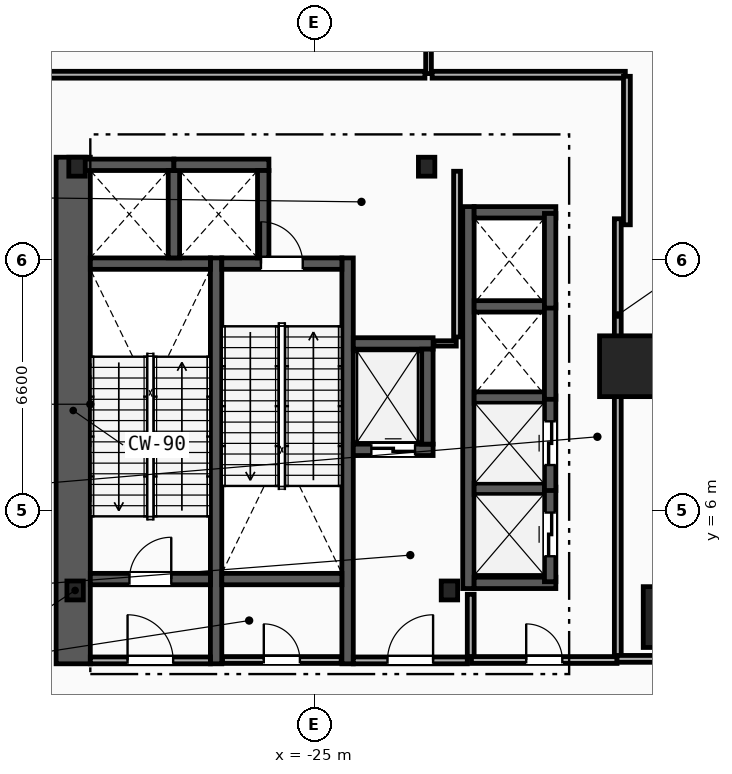
"""IFC4 building model, lengths in metres.
Left out: names, types, materials, properties, quantities, classifications, styles, units other than length and angle.
Written with IfcOpenShell. Run it as: python <this file> out.ifc"""

import sys

from ifc_helpers import new_model, si_unit, direction, frame, frame_2d, origin, origin_2d, place, context, subcontext, project, spatial, rectangle, i_section, extrude, element, fill, save


model = new_model("IFC4")
c1 = context("Model", 3, precision=1e-05, world=origin(), true_north=direction((0.0, 1.0)))
c2 = subcontext(c1, "Body", "Model", "MODEL_VIEW")
j1 = project(units=[si_unit("LENGTHUNIT", "METRE"), si_unit("PLANEANGLEUNIT", "RADIAN")], contexts=[c1])
p1 = place(None, origin())
s1 = spatial("IfcSite", under=j1, at=p1, CompositionType="ELEMENT")
p2 = place(p1, origin())
s2 = spatial("IfcBuilding", under=s1, at=p2, CompositionType="ELEMENT")
p3 = place(p2, frame((0.0, 0.0, 6.0)))
s3 = spatial("IfcBuildingStorey", under=s2, at=p3, CompositionType="ELEMENT", Elevation=6.0)
for number, where, z_axis, x_axis in (
    (1, (-31.3, 3.9, 0.0), (0.0, 0.0, 1.0), (1.0, 0.0, 0.0)),
    (2, (-21.45, 3.9, 0.0), (0.0, 0.0, 1.0), (1.0, 0.0, 0.0)),
    (3, (-22.05, 15.05, 0.0), (0.0, 0.0, 1.0), (1.0, 0.0, 0.0)),
    (4, (-31.25, 15.05, 0.0), (0.0, 0.0, 1.0), (1.0, 0.0, 0.0)),
):
    element("IfcColumn", number, at=place(p3, frame(where, z_axis=z_axis, x_axis=x_axis)), inside=s3, PredefinedType="COLUMN", context=c2, shape_type="SweptSolid", body=[
        extrude(i_section(OverallWidth=0.432, OverallDepth=0.498, WebThickness=0.056, FlangeThickness=0.089, FilletRadius=0.018, at=origin_2d()), origin(), (0.0, 0.0, 1.0), 6.0),
    ])
for number, where, z_axis, x_axis in (
    (5, (-15.55, 3.2, 0.0), (0.0, 0.0, 1.0), (1.0, 0.0, 0.0)),
    (6, (-16.7, 9.8, 0.0), (0.0, 0.0, 1.0), (1.0, 0.0, 0.0)),
):
    element("IfcColumn", number, at=place(p3, frame(where, z_axis=z_axis, x_axis=x_axis)), inside=s3, PredefinedType="COLUMN", context=c2, shape_type="SweptSolid", body=[
        extrude(rectangle(XDim=1.6, YDim=1.6, at=origin_2d()), origin(), (0.0, 0.0, 1.0), 6.0),
    ])
p4 = place(p3, frame((-31.35, 1.97, 0.0), z_axis=(0.0, 0.0, 1.0), x_axis=(0.0, 1.0, 0.0)))
e7 = element("IfcWall", 7, at=p4, inside=s3, PredefinedType="SHEAR", context=c2, shape_type="SweptSolid", body=[
    extrude(rectangle(XDim=13.33, YDim=0.9, at=frame_2d((6.665, 0.0))), origin(), (0.0, 0.0, 1.0), 5.65),
])
for number, where, z_axis, x_axis in (
    (8, (-27.59, 1.97, 0.0), (0.0, 0.0, 1.0), (0.0, 1.0, 0.0)),
    (9, (-24.13, 1.97, 0.0), (0.0, 0.0, 1.0), (0.0, 1.0, 0.0)),
):
    element("IfcWall", number, at=place(p3, frame(where, z_axis=z_axis, x_axis=x_axis)), inside=s3, PredefinedType="SHEAR", context=c2, shape_type="SweptSolid", body=[
        extrude(rectangle(XDim=10.68, YDim=0.3, at=frame_2d((5.34, 0.0))), origin(), (0.0, 0.0, 1.0), 5.65),
    ])
p5 = place(p3, frame((-30.9, 4.2, 0.0), z_axis=(0.0, 0.0, 1.0), x_axis=(1.0, 0.0, 0.0)))
e10 = element("IfcWall", 10, at=p5, inside=s3, PredefinedType="SHEAR", context=c2, shape_type="SweptSolid", body=[
    extrude(rectangle(XDim=3.16, YDim=0.3, at=frame_2d((1.58, 0.0))), origin(), (0.0, 0.0, 1.0), 5.65),
])
p6 = place(p5, frame((1.03, 0.0, 0.0)))
e11 = element("IfcOpeningElement", 11, at=p6, cuts=e10, PredefinedType="OPENING", context=c2, shape_type="SweptSolid", body=[
    extrude(rectangle(XDim=1.1, YDim=2.15, at=frame_2d((0.55, 1.075))), frame((0.0, 0.16, 0.0), z_axis=(0.0, -1.0, 0.0), x_axis=(1.0, 0.0, 0.0)), (0.0, 0.0, 1.0), 0.32),
])
p7 = place(p3, frame((-30.9, 12.5, 0.0), z_axis=(0.0, 0.0, 1.0), x_axis=(1.0, 0.0, 0.0)))
e12 = element("IfcWall", 12, at=p7, inside=s3, PredefinedType="SHEAR", context=c2, shape_type="SweptSolid", body=[
    extrude(rectangle(XDim=3.16, YDim=0.3, at=frame_2d((1.58, 0.0))), origin(), (0.0, 0.0, 1.0), 5.65),
])
p8 = place(p3, frame((-27.44, 12.5, 0.0), z_axis=(0.0, 0.0, 1.0), x_axis=(1.0, 0.0, 0.0)))
e13 = element("IfcWall", 13, at=p8, inside=s3, PredefinedType="SHEAR", context=c2, shape_type="SweptSolid", body=[
    extrude(rectangle(XDim=3.16, YDim=0.3, at=frame_2d((1.58, 0.0))), origin(), (0.0, 0.0, 1.0), 5.65),
])
p9 = place(p8, frame((1.03, 0.0, 0.0)))
e14 = element("IfcOpeningElement", 14, at=p9, cuts=e13, PredefinedType="OPENING", context=c2, shape_type="SweptSolid", body=[
    extrude(rectangle(XDim=1.1, YDim=2.15, at=frame_2d((0.55, 1.075))), frame((0.0, 0.16, 0.0), z_axis=(0.0, -1.0, 0.0), x_axis=(1.0, 0.0, 0.0)), (0.0, 0.0, 1.0), 0.32),
])
p10 = place(p3, frame((-27.44, 4.2, 0.0), z_axis=(0.0, 0.0, 1.0), x_axis=(1.0, 0.0, 0.0)))
e15 = element("IfcWall", 15, at=p10, inside=s3, PredefinedType="SHEAR", context=c2, shape_type="SweptSolid", body=[
    extrude(rectangle(XDim=3.16, YDim=0.3, at=frame_2d((1.58, 0.0))), origin(), (0.0, 0.0, 1.0), 5.65),
])
p11 = place(p3, frame((-20.89, 2.15, 0.0), z_axis=(0.0, 0.0, 1.0), x_axis=(0.0, 1.0, 0.0)))
e16 = element("IfcWall", 16, at=p11, inside=s3, PredefinedType="PARTITIONING", context=c2, shape_type="SweptSolid", body=[
    extrude(rectangle(XDim=1.65, YDim=0.18, at=frame_2d((0.825, 0.0))), origin(), (0.0, 0.0, 1.0), 5.65),
])
p12 = place(p3, frame((-23.98, 2.06, 0.0), z_axis=(0.0, 0.0, 1.0), x_axis=(1.0, 0.0, 0.0)))
e17 = element("IfcWall", 17, at=p12, inside=s3, PredefinedType="PARTITIONING", context=c2, shape_type="SweptSolid", body=[
    extrude(rectangle(XDim=3.0, YDim=0.18, at=frame_2d((1.5, 0.0))), origin(), (0.0, 0.0, 1.0), 5.65),
])
p13 = place(p12, frame((0.9, 0.0, 0.0)))
e18 = element("IfcOpeningElement", 18, at=p13, cuts=e17, PredefinedType="OPENING", context=c2, shape_type="SweptSolid", body=[
    extrude(rectangle(XDim=1.2, YDim=2.15, at=frame_2d((0.6, 1.075))), frame((0.0, 0.1, 0.0), z_axis=(0.0, -1.0, 0.0), x_axis=(1.0, 0.0, 0.0)), (0.0, 0.0, 1.0), 0.2),
])
p14 = place(p3, frame((-30.9, 2.06, 0.0), z_axis=(0.0, 0.0, 1.0), x_axis=(1.0, 0.0, 0.0)))
e19 = element("IfcWall", 19, at=p14, inside=s3, PredefinedType="PARTITIONING", context=c2, shape_type="SweptSolid", body=[
    extrude(rectangle(XDim=3.16, YDim=0.18, at=frame_2d((1.58, 0.0))), origin(), (0.0, 0.0, 1.0), 5.65),
])
p15 = place(p14, frame((0.98, 0.0, 0.0)))
e20 = element("IfcOpeningElement", 20, at=p15, cuts=e19, PredefinedType="OPENING", context=c2, shape_type="SweptSolid", body=[
    extrude(rectangle(XDim=1.2, YDim=2.15, at=frame_2d((0.6, 1.075))), frame((0.0, 0.1, 0.0), z_axis=(0.0, -1.0, 0.0), x_axis=(1.0, 0.0, 0.0)), (0.0, 0.0, 1.0), 0.2),
])
p16 = place(p3, frame((-23.98, 7.6, 0.0), z_axis=(0.0, 0.0, 1.0), x_axis=(1.0, 0.0, 0.0)))
e21 = element("IfcWall", 21, at=p16, inside=s3, PredefinedType="SHEAR", context=c2, shape_type="SweptSolid", body=[
    extrude(rectangle(XDim=2.1, YDim=0.3, at=frame_2d((1.05, 0.0))), origin(), (0.0, 0.0, 1.0), 5.65),
])
p17 = place(p16, frame((0.475, 0.0, 0.0)))
e22 = element("IfcOpeningElement", 22, at=p17, cuts=e21, PredefinedType="OPENING", context=c2, shape_type="SweptSolid", body=[
    extrude(rectangle(XDim=1.15, YDim=2.2, at=frame_2d((0.575, 1.1))), frame((0.0, 0.16, 0.0), z_axis=(0.0, -1.0, 0.0), x_axis=(1.0, 0.0, 0.0)), (0.0, 0.0, 1.0), 0.32),
])
p18 = place(p3, frame((-23.98, 10.4, 0.0), z_axis=(0.0, 0.0, 1.0), x_axis=(1.0, 0.0, 0.0)))
e23 = element("IfcWall", 23, at=p18, inside=s3, PredefinedType="SHEAR", context=c2, shape_type="SweptSolid", body=[
    extrude(rectangle(XDim=2.1, YDim=0.3, at=frame_2d((1.05, 0.0))), origin(), (0.0, 0.0, 1.0), 5.65),
])
for number, where, z_axis, x_axis in (
    (24, (-22.03, 7.75, 0.0), (0.0, 0.0, 1.0), (0.0, 1.0, 0.0)),
    (25, (-31.2, 15.1, 0.0), (0.0, 0.0, 1.0), (1.0, 0.0, 0.0)),
):
    element("IfcWall", number, at=place(p3, frame(where, z_axis=z_axis, x_axis=x_axis)), inside=s3, PredefinedType="SHEAR", context=c2, shape_type="SweptSolid", body=[
        extrude(rectangle(XDim=2.5, YDim=0.3, at=frame_2d((1.25, 0.0))), origin(), (0.0, 0.0, 1.0), 5.65),
    ])
p19 = place(p3, frame((-28.7, 12.65, 0.0), z_axis=(0.0, 0.0, 1.0), x_axis=(0.0, 1.0, 0.0)))
e26 = element("IfcWall", 26, at=p19, inside=s3, PredefinedType="SHEAR", context=c2, shape_type="SweptSolid", body=[
    extrude(rectangle(XDim=2.3, YDim=0.3, at=frame_2d((1.15, 0.0))), origin(), (0.0, 0.0, 1.0), 5.65),
])
p20 = place(p3, frame((-28.7, 15.1, 0.0), z_axis=(0.0, 0.0, 1.0), x_axis=(1.0, 0.0, 0.0)))
e27 = element("IfcWall", 27, at=p20, inside=s3, PredefinedType="SHEAR", context=c2, shape_type="SweptSolid", body=[
    extrude(rectangle(XDim=2.5, YDim=0.3, at=frame_2d((1.25, 0.0))), origin(), (0.0, 0.0, 1.0), 5.65),
])
p21 = place(p3, frame((-26.35, 12.65, 0.0), z_axis=(0.0, 0.0, 1.0), x_axis=(0.0, 1.0, 0.0)))
e28 = element("IfcWall", 28, at=p21, inside=s3, PredefinedType="SHEAR", context=c2, shape_type="SweptSolid", body=[
    extrude(rectangle(XDim=2.3, YDim=0.3, at=frame_2d((1.15, 0.0))), origin(), (0.0, 0.0, 1.0), 5.65),
])
p22 = place(p3, frame((-20.95, 3.95, 0.0), z_axis=(0.0, 0.0, 1.0), x_axis=(0.0, 1.0, 0.0)))
e29 = element("IfcWall", 29, at=p22, inside=s3, PredefinedType="SHEAR", context=c2, shape_type="SweptSolid", body=[
    extrude(rectangle(XDim=10.05, YDim=0.3, at=frame_2d((5.025, 0.0))), origin(), (0.0, 0.0, 1.0), 5.65),
])
for number, where, z_axis, x_axis in (
    (30, (-20.8, 4.1, 0.0), (0.0, 0.0, 1.0), (1.0, 0.0, 0.0)),
    (31, (-20.8, 13.85, 0.0), (0.0, 0.0, 1.0), (1.0, 0.0, 0.0)),
):
    element("IfcWall", number, at=place(p3, frame(where, z_axis=z_axis, x_axis=x_axis)), inside=s3, PredefinedType="SHEAR", context=c2, shape_type="SweptSolid", body=[
        extrude(rectangle(XDim=2.15, YDim=0.3, at=frame_2d((1.075, 0.0))), origin(), (0.0, 0.0, 1.0), 5.65),
    ])
for number, where, z_axis, x_axis in (
    (32, (-20.8, 6.575, 0.0), (0.0, 0.0, 1.0), (1.0, 0.0, 0.0)),
    (33, (-20.8, 8.975, 0.0), (0.0, 0.0, 1.0), (1.0, 0.0, 0.0)),
    (34, (-20.8, 11.375, 0.0), (0.0, 0.0, 1.0), (1.0, 0.0, 0.0)),
):
    element("IfcWall", number, at=place(p3, frame(where, z_axis=z_axis, x_axis=x_axis)), inside=s3, PredefinedType="SHEAR", context=c2, shape_type="SweptSolid", body=[
        extrude(rectangle(XDim=1.85, YDim=0.3, at=frame_2d((0.925, 0.0))), origin(), (0.0, 0.0, 1.0), 5.65),
    ])
p23 = place(p3, frame((-18.8, 4.13, 0.0), z_axis=(0.0, 0.0, 1.0), x_axis=(0.0, 1.0, 0.0)))
e35 = element("IfcWall", 35, at=p23, inside=s3, PredefinedType="SHEAR", context=c2, shape_type="SweptSolid", body=[
    extrude(rectangle(XDim=2.49, YDim=0.3, at=frame_2d((1.245, 0.0))), origin(), (0.0, 0.0, 1.0), 5.65),
])
p24 = place(p23, frame((0.67, 0.0, 0.0)))
e36 = element("IfcOpeningElement", 36, at=p24, cuts=e35, PredefinedType="OPENING", context=c2, shape_type="SweptSolid", body=[
    extrude(rectangle(XDim=1.15, YDim=2.2, at=frame_2d((0.575, 1.1))), frame((0.0, 0.16, 0.0), z_axis=(0.0, -1.0, 0.0), x_axis=(1.0, 0.0, 0.0)), (0.0, 0.0, 1.0), 0.32),
])
p25 = place(p3, frame((-18.8, 6.53, 0.0), z_axis=(0.0, 0.0, 1.0), x_axis=(0.0, 1.0, 0.0)))
e37 = element("IfcWall", 37, at=p25, inside=s3, PredefinedType="SHEAR", context=c2, shape_type="SweptSolid", body=[
    extrude(rectangle(XDim=2.49, YDim=0.3, at=frame_2d((1.245, 0.0))), origin(), (0.0, 0.0, 1.0), 5.65),
])
p26 = place(p25, frame((0.67, 0.0, 0.0)))
e38 = element("IfcOpeningElement", 38, at=p26, cuts=e37, PredefinedType="OPENING", context=c2, shape_type="SweptSolid", body=[
    extrude(rectangle(XDim=1.15, YDim=2.2, at=frame_2d((0.575, 1.1))), frame((0.0, 0.16, 0.0), z_axis=(0.0, -1.0, 0.0), x_axis=(1.0, 0.0, 0.0)), (0.0, 0.0, 1.0), 0.32),
])
for number, where, z_axis, x_axis in (
    (39, (-18.8, 8.93, 0.0), (0.0, 0.0, 1.0), (0.0, 1.0, 0.0)),
    (40, (-18.8, 11.33, 0.0), (0.0, 0.0, 1.0), (0.0, 1.0, 0.0)),
):
    element("IfcWall", number, at=place(p3, frame(where, z_axis=z_axis, x_axis=x_axis)), inside=s3, PredefinedType="SHEAR", context=c2, shape_type="SweptSolid", body=[
        extrude(rectangle(XDim=2.49, YDim=0.3, at=frame_2d((1.245, 0.0))), origin(), (0.0, 0.0, 1.0), 5.65),
    ])
p27 = place(p3, frame((-17.02, 2.17, 0.0), z_axis=(0.0, 0.0, 1.0), x_axis=(0.0, 1.0, 0.0)))
e41 = element("IfcWall", 41, at=p27, inside=s3, PredefinedType="PARTITIONING", context=c2, shape_type="SweptSolid", body=[
    extrude(rectangle(XDim=11.51, YDim=0.18, at=frame_2d((5.755, 0.0))), origin(), (0.0, 0.0, 1.0), 5.65),
])
p28 = place(p3, frame((-20.87, 2.07, 0.0), z_axis=(0.0, 0.0, 1.0), x_axis=(1.0, 0.0, 0.0)))
e42 = element("IfcWall", 42, at=p28, inside=s3, PredefinedType="PARTITIONING", context=c2, shape_type="SweptSolid", body=[
    extrude(rectangle(XDim=3.83, YDim=0.18, at=frame_2d((1.915, 0.0))), origin(), (0.0, 0.0, 1.0), 5.65),
])
p29 = place(p28, frame((1.44, 0.0, 0.0)))
e43 = element("IfcOpeningElement", 43, at=p29, cuts=e42, PredefinedType="OPENING", context=c2, shape_type="SweptSolid", body=[
    extrude(rectangle(XDim=0.95, YDim=2.1, at=frame_2d((0.475, 1.05))), frame((0.0, 0.1, 0.0), z_axis=(0.0, -1.0, 0.0), x_axis=(1.0, 0.0, 0.0)), (0.0, 0.0, 1.0), 0.2),
])
p30 = place(p3, frame((-21.86, 10.4, 0.0), z_axis=(0.0, 0.0, 1.0), x_axis=(1.0, 0.0, 0.0)))
e44 = element("IfcWall", 44, at=p30, inside=s3, PredefinedType="PARTITIONING", context=c2, shape_type="SweptSolid", body=[
    extrude(rectangle(XDim=0.59, YDim=0.14, at=frame_2d((0.295, 0.0))), origin(), (0.0, 0.0, 1.0), 5.65),
])
p31 = place(p3, frame((-21.25, 10.57, 0.0), z_axis=(0.0, 0.0, 1.0), x_axis=(0.0, 1.0, 0.0)))
e45 = element("IfcWall", 45, at=p31, inside=s3, PredefinedType="PARTITIONING", context=c2, shape_type="SweptSolid", body=[
    extrude(rectangle(XDim=4.36, YDim=0.18, at=frame_2d((2.18, 0.0))), origin(), (0.0, 0.0, 1.0), 5.65),
])
p32 = place(p3, frame((-27.42, 2.07, 0.0), z_axis=(0.0, 0.0, 1.0), x_axis=(1.0, 0.0, 0.0)))
e46 = element("IfcWall", 46, at=p32, inside=s3, PredefinedType="PARTITIONING", context=c2, shape_type="SweptSolid", body=[
    extrude(rectangle(XDim=3.12, YDim=0.18, at=frame_2d((1.56, 0.0))), origin(), (0.0, 0.0, 1.0), 5.65),
])
p33 = place(p32, frame((1.085, 0.0, 0.0)))
e47 = element("IfcOpeningElement", 47, at=p33, cuts=e46, PredefinedType="OPENING", context=c2, shape_type="SweptSolid", body=[
    extrude(rectangle(XDim=0.95, YDim=2.1, at=frame_2d((0.475, 1.05))), frame((0.0, 0.1, 0.0), z_axis=(0.0, -1.0, 0.0), x_axis=(1.0, 0.0, 0.0)), (0.0, 0.0, 1.0), 0.2),
])
p34 = place(p3, frame((-22.0, 17.5, 0.0), z_axis=(0.0, 0.0, 1.0), x_axis=(0.0, 1.0, 0.0)))
e48 = element("IfcWall", 48, at=p34, inside=s3, PredefinedType="PARTITIONING", context=c2, shape_type="SweptSolid", body=[
    extrude(rectangle(XDim=10.38, YDim=0.15, at=frame_2d((5.19, 0.0))), origin(), (0.0, 0.0, 1.0), 5.65),
])
p35 = place(p34, frame((4.19, 0.0, 1.05)))
e49 = element("IfcOpeningElement", 49, at=p35, cuts=e48, PredefinedType="OPENING", context=c2, shape_type="SweptSolid", body=[
    extrude(rectangle(XDim=2.0, YDim=1.5, at=frame_2d((1.0, 0.75))), frame((0.0, 0.085, 0.0), z_axis=(0.0, -1.0, 0.0), x_axis=(1.0, 0.0, 0.0)), (0.0, 0.0, 1.0), 0.17),
])
p36 = place(p3, frame((-22.095, 17.47, 0.0), z_axis=(0.0, 0.0, 1.0), x_axis=(-1.0, 0.0, 0.0)))
e50 = element("IfcWall", 50, at=p36, inside=s3, PredefinedType="PARTITIONING", context=c2, shape_type="SweptSolid", body=[
    extrude(rectangle(XDim=11.533, YDim=0.18, at=frame_2d((5.767, 0.0))), origin(), (0.0, 0.0, 1.0), 4.877),
])
p37 = place(p3, frame((-10.3, 2.1, 0.0), z_axis=(0.0, 0.0, 1.0), x_axis=(-1.0, 0.0, 0.0)))
e51 = element("IfcWall", 51, at=p37, inside=s3, PredefinedType="PARTITIONING", context=c2, shape_type="SweptSolid", body=[
    extrude(rectangle(XDim=6.74, YDim=0.18, at=frame_2d((3.37, 0.0))), origin(), (0.0, 0.0, 1.0), 4.877),
])
p38 = place(p3, frame((-16.822, 17.47, 0.0), z_axis=(0.0, 0.0, 1.0), x_axis=(-1.0, 0.0, 0.0)))
e52 = element("IfcWall", 52, at=p38, inside=s3, PredefinedType="PARTITIONING", context=c2, shape_type="SweptSolid", body=[
    extrude(rectangle(XDim=5.083, YDim=0.18, at=frame_2d((2.542, 0.0))), origin(), (0.0, 0.0, 1.0), 5.65),
])
p39 = place(p3, frame((-16.78, 13.521, 0.0), z_axis=(0.0, 0.0, 1.0), x_axis=(0.0, 1.0, 0.0)))
e53 = element("IfcWall", 53, at=p39, inside=s3, PredefinedType="PARTITIONING", context=c2, shape_type="SweptSolid", body=[
    extrude(rectangle(XDim=3.907, YDim=0.18, at=frame_2d((1.954, 0.0))), origin(), (0.0, 0.0, 1.0), 5.65),
])
p40 = place(p6, origin())
e54 = element("IfcDoor", 54, at=p40, inside=s3, OperationType="SINGLE_SWING_RIGHT", PredefinedType="DOOR", context=c2, shape_type="SweptSolid", body=[
    extrude(rectangle(XDim=1.1, YDim=2.15, at=frame_2d((0.55, 1.075))), frame((0.0, 0.025, 0.0), z_axis=(0.0, -1.0, 0.0), x_axis=(1.0, 0.0, 0.0)), (0.0, 0.0, 1.0), 0.05),
])
fill(e11, e54)
p41 = place(p9, origin())
e55 = element("IfcDoor", 55, at=p41, inside=s3, OperationType="SINGLE_SWING_LEFT", PredefinedType="DOOR", context=c2, shape_type="SweptSolid", body=[
    extrude(rectangle(XDim=1.1, YDim=2.15, at=frame_2d((0.55, 1.075))), frame((0.0, 0.025, 0.0), z_axis=(0.0, -1.0, 0.0), x_axis=(1.0, 0.0, 0.0)), (0.0, 0.0, 1.0), 0.05),
])
fill(e14, e55)
p42 = place(p13, origin())
e56 = element("IfcDoor", 56, at=p42, inside=s3, OperationType="SINGLE_SWING_RIGHT", PredefinedType="DOOR", context=c2, shape_type="SweptSolid", body=[
    extrude(rectangle(XDim=1.2, YDim=2.15, at=frame_2d((0.6, 1.075))), frame((0.0, 0.025, 0.0), z_axis=(0.0, -1.0, 0.0), x_axis=(1.0, 0.0, 0.0)), (0.0, 0.0, 1.0), 0.05),
])
fill(e18, e56)
p43 = place(p15, origin())
e57 = element("IfcDoor", 57, at=p43, inside=s3, OperationType="SINGLE_SWING_LEFT", PredefinedType="DOOR", context=c2, shape_type="SweptSolid", body=[
    extrude(rectangle(XDim=1.2, YDim=2.15, at=frame_2d((0.6, 1.075))), frame((0.0, 0.025, 0.0), z_axis=(0.0, -1.0, 0.0), x_axis=(1.0, 0.0, 0.0)), (0.0, 0.0, 1.0), 0.05),
])
fill(e20, e57)
p44 = place(p17, origin())
e58 = element("IfcDoor", 58, at=p44, inside=s3, OperationType="SLIDING_TO_LEFT", PredefinedType="TRAPDOOR", context=c2, shape_type="SweptSolid", body=[
    extrude(rectangle(XDim=1.15, YDim=2.2, at=frame_2d((0.575, 1.1))), frame((0.0, 0.025, 0.0), z_axis=(0.0, -1.0, 0.0), x_axis=(1.0, 0.0, 0.0)), (0.0, 0.0, 1.0), 0.05),
])
fill(e22, e58)
p45 = place(p24, origin())
e59 = element("IfcDoor", 59, at=p45, inside=s3, OperationType="SLIDING_TO_LEFT", PredefinedType="TRAPDOOR", context=c2, shape_type="SweptSolid", body=[
    extrude(rectangle(XDim=1.15, YDim=2.2, at=frame_2d((0.575, 1.1))), frame((0.0, 0.025, 0.0), z_axis=(0.0, -1.0, 0.0), x_axis=(1.0, 0.0, 0.0)), (0.0, 0.0, 1.0), 0.05),
])
fill(e36, e59)
p46 = place(p26, origin())
e60 = element("IfcDoor", 60, at=p46, inside=s3, OperationType="SLIDING_TO_LEFT", PredefinedType="TRAPDOOR", context=c2, shape_type="SweptSolid", body=[
    extrude(rectangle(XDim=1.15, YDim=2.2, at=frame_2d((0.575, 1.1))), frame((0.0, 0.025, 0.0), z_axis=(0.0, -1.0, 0.0), x_axis=(1.0, 0.0, 0.0)), (0.0, 0.0, 1.0), 0.05),
])
fill(e38, e60)
p47 = place(p29, origin())
e61 = element("IfcDoor", 61, at=p47, inside=s3, OperationType="SINGLE_SWING_LEFT", PredefinedType="DOOR", context=c2, shape_type="SweptSolid", body=[
    extrude(rectangle(XDim=0.95, YDim=2.1, at=frame_2d((0.475, 1.05))), frame((0.0, 0.025, 0.0), z_axis=(0.0, -1.0, 0.0), x_axis=(1.0, 0.0, 0.0)), (0.0, 0.0, 1.0), 0.05),
])
fill(e43, e61)
p48 = place(p33, origin())
e62 = element("IfcDoor", 62, at=p48, inside=s3, OperationType="SINGLE_SWING_LEFT", PredefinedType="DOOR", context=c2, shape_type="SweptSolid", body=[
    extrude(rectangle(XDim=0.95, YDim=2.1, at=frame_2d((0.475, 1.05))), frame((0.0, 0.025, 0.0), z_axis=(0.0, -1.0, 0.0), x_axis=(1.0, 0.0, 0.0)), (0.0, 0.0, 1.0), 0.05),
])
fill(e47, e62)
save(model, sys.argv[1])
